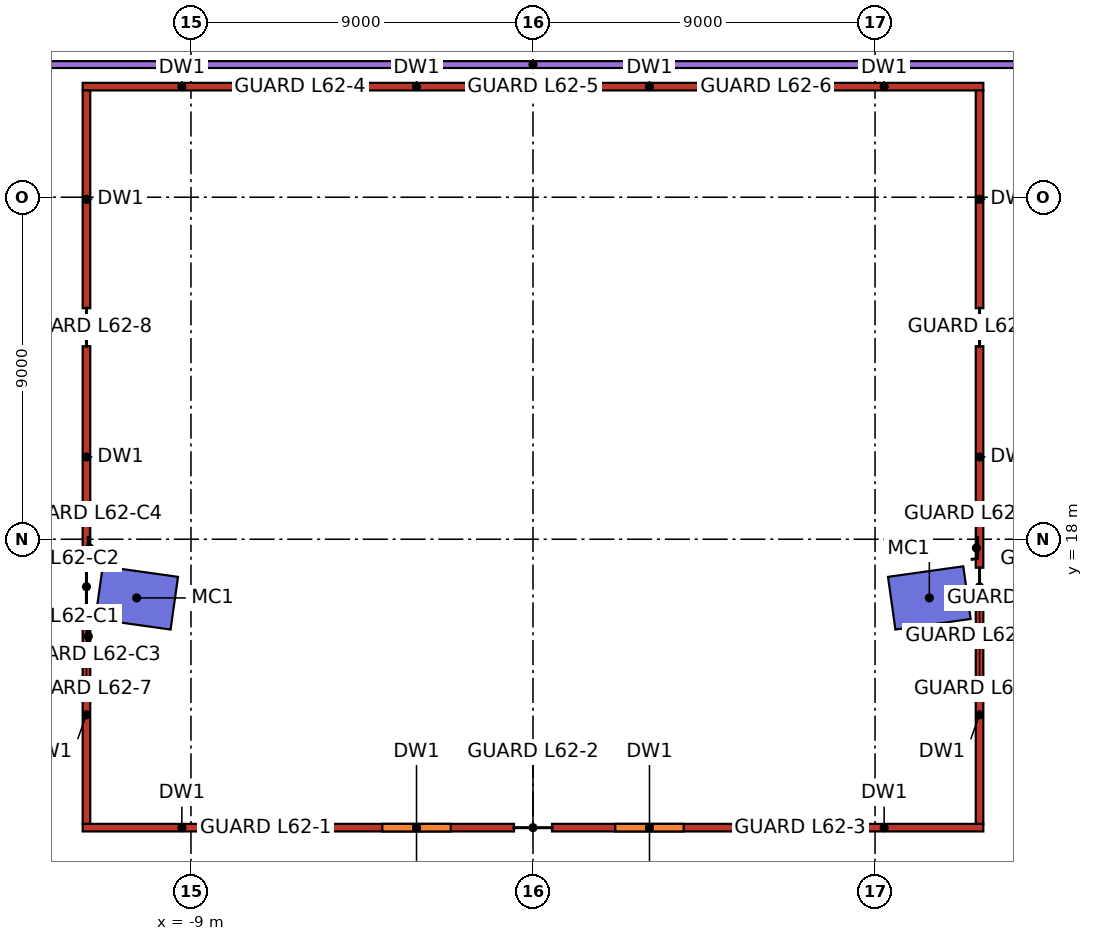
"""IFC4 building model, lengths in metres.
Left out: names, types, materials, properties, quantities, classifications, styles, units other than length and angle.
Written with IfcOpenShell. Run it as: python <this file> out.ifc"""

import sys

from ifc_helpers import new_model, si_unit, direction, frame, frame_2d, origin, origin_2d, place, context, subcontext, project, spatial, rectangle, hollow_rectangle, extrude, element, fill, save


model = new_model("IFC4")
c1 = context("Model", 3, precision=1e-05, world=origin(), true_north=direction((0.0, 1.0)))
c2 = subcontext(c1, "Body", "Model", "MODEL_VIEW")
j1 = project(units=[si_unit("LENGTHUNIT", "METRE"), si_unit("PLANEANGLEUNIT", "RADIAN")], contexts=[c1])
p1 = place(None, origin())
s1 = spatial("IfcSite", under=j1, at=p1, CompositionType="ELEMENT")
p2 = place(p1, origin())
s2 = spatial("IfcBuilding", under=s1, at=p2, CompositionType="ELEMENT")
p3 = place(p2, frame((0.0, 0.0, 258.4)))
s3 = spatial("IfcBuildingStorey", under=s2, at=p3, CompositionType="ELEMENT", Elevation=258.4)
for number, where, z_axis, x_axis in (
    (1, (-10.429, 16.456, 0.0), (0.0, 0.0, 1.0), (-0.99, 0.139, 0.0)),
    (2, (10.429, 16.456, 0.0), (0.0, 0.0, 1.0), (0.99, 0.139, 0.0)),
):
    element("IfcColumn", number, at=place(p3, frame(where, z_axis=z_axis, x_axis=x_axis)), inside=s3, PredefinedType="COLUMN", context=c2, shape_type="SweptSolid", body=[
        extrude(hollow_rectangle(XDim=2.0, YDim=1.4, WallThickness=0.06, at=origin_2d()), origin(), (0.0, 0.0, 1.0), 3.8),
    ])
for number, where, z_axis, x_axis in (
    (3, (-11.85, 10.41, 0.0), (0.0, 0.0, 1.0), (1.0, 0.0, 0.0)),
    (4, (-11.85, 29.91, 0.0), (0.0, 0.0, 1.0), (1.0, 0.0, 0.0)),
):
    element("IfcWall", number, at=place(p3, frame(where, z_axis=z_axis, x_axis=x_axis)), inside=s3, PredefinedType="PARTITIONING", context=c2, shape_type="SweptSolid", body=[
        extrude(rectangle(XDim=5.22, YDim=0.2, at=frame_2d((2.61, 0.0))), origin(), (0.0, 0.0, 1.0), 3.3),
    ])
p4 = place(p3, frame((-5.63, 10.41, 0.0), z_axis=(0.0, 0.0, 1.0), x_axis=(1.0, 0.0, 0.0)))
e5 = element("IfcWall", 5, at=p4, inside=s3, PredefinedType="PARTITIONING", context=c2, shape_type="SweptSolid", body=[
    extrude(rectangle(XDim=5.13, YDim=0.2, at=frame_2d((2.565, 0.0))), origin(), (0.0, 0.0, 1.0), 3.3),
])
p5 = place(p4, frame((1.665, 0.0, 0.0)))
e6 = element("IfcOpeningElement", 6, at=p5, cuts=e5, PredefinedType="OPENING", context=c2, shape_type="SweptSolid", body=[
    extrude(rectangle(XDim=1.8, YDim=2.1, at=frame_2d((0.9, 1.05))), frame((0.0, 0.1, 0.0), z_axis=(0.0, -1.0, 0.0), x_axis=(1.0, 0.0, 0.0)), (0.0, 0.0, 1.0), 0.2),
])
p6 = place(p3, frame((-5.63, 29.91, 0.0), z_axis=(0.0, 0.0, 1.0), x_axis=(1.0, 0.0, 0.0)))
e7 = element("IfcWall", 7, at=p6, inside=s3, PredefinedType="PARTITIONING", context=c2, shape_type="SweptSolid", body=[
    extrude(rectangle(XDim=5.13, YDim=0.2, at=frame_2d((2.565, 0.0))), origin(), (0.0, 0.0, 1.0), 3.3),
])
p7 = place(p3, frame((0.5, 10.41, 0.0), z_axis=(0.0, 0.0, 1.0), x_axis=(1.0, 0.0, 0.0)))
e8 = element("IfcWall", 8, at=p7, inside=s3, PredefinedType="PARTITIONING", context=c2, shape_type="SweptSolid", body=[
    extrude(rectangle(XDim=5.13, YDim=0.2, at=frame_2d((2.565, 0.0))), origin(), (0.0, 0.0, 1.0), 3.3),
])
p8 = place(p7, frame((1.665, 0.0, 0.0)))
e9 = element("IfcOpeningElement", 9, at=p8, cuts=e8, PredefinedType="OPENING", context=c2, shape_type="SweptSolid", body=[
    extrude(rectangle(XDim=1.8, YDim=2.1, at=frame_2d((0.9, 1.05))), frame((0.0, 0.1, 0.0), z_axis=(0.0, -1.0, 0.0), x_axis=(1.0, 0.0, 0.0)), (0.0, 0.0, 1.0), 0.2),
])
p9 = place(p3, frame((0.5, 29.91, 0.0), z_axis=(0.0, 0.0, 1.0), x_axis=(1.0, 0.0, 0.0)))
e10 = element("IfcWall", 10, at=p9, inside=s3, PredefinedType="PARTITIONING", context=c2, shape_type="SweptSolid", body=[
    extrude(rectangle(XDim=5.13, YDim=0.2, at=frame_2d((2.565, 0.0))), origin(), (0.0, 0.0, 1.0), 3.3),
])
for number, where, z_axis, x_axis in (
    (11, (6.63, 10.41, 0.0), (0.0, 0.0, 1.0), (1.0, 0.0, 0.0)),
    (12, (6.63, 29.91, 0.0), (0.0, 0.0, 1.0), (1.0, 0.0, 0.0)),
):
    element("IfcWall", number, at=place(p3, frame(where, z_axis=z_axis, x_axis=x_axis)), inside=s3, PredefinedType="PARTITIONING", context=c2, shape_type="SweptSolid", body=[
        extrude(rectangle(XDim=5.22, YDim=0.2, at=frame_2d((2.61, 0.0))), origin(), (0.0, 0.0, 1.0), 3.3),
    ])
for number, where, z_axis, x_axis in (
    (13, (-11.75, 10.51, 0.0), (0.0, 0.0, 1.0), (0.0, 1.0, 0.0)),
    (14, (11.75, 10.51, 0.0), (0.0, 0.0, 1.0), (0.0, 1.0, 0.0)),
):
    element("IfcWall", number, at=place(p3, frame(where, z_axis=z_axis, x_axis=x_axis)), inside=s3, PredefinedType="PARTITIONING", context=c2, shape_type="SweptSolid", body=[
        extrude(rectangle(XDim=5.74, YDim=0.2, at=frame_2d((2.87, 0.0))), origin(), (0.0, 0.0, 1.0), 3.3),
    ])
for number, where, z_axis, x_axis in (
    (15, (-11.75, 17.25, 0.0), (0.0, 0.0, 1.0), (0.0, 1.0, 0.0)),
    (16, (11.75, 17.25, 0.0), (0.0, 0.0, 1.0), (0.0, 1.0, 0.0)),
):
    element("IfcWall", number, at=place(p3, frame(where, z_axis=z_axis, x_axis=x_axis)), inside=s3, PredefinedType="PARTITIONING", context=c2, shape_type="SweptSolid", body=[
        extrude(rectangle(XDim=5.83, YDim=0.2, at=frame_2d((2.915, 0.0))), origin(), (0.0, 0.0, 1.0), 3.3),
    ])
for number, where, z_axis, x_axis in (
    (17, (-11.75, 24.08, 0.0), (0.0, 0.0, 1.0), (0.0, 1.0, 0.0)),
    (18, (11.75, 24.08, 0.0), (0.0, 0.0, 1.0), (0.0, 1.0, 0.0)),
):
    element("IfcWall", number, at=place(p3, frame(where, z_axis=z_axis, x_axis=x_axis)), inside=s3, PredefinedType="PARTITIONING", context=c2, shape_type="SweptSolid", body=[
        extrude(rectangle(XDim=5.73, YDim=0.2, at=frame_2d((2.865, 0.0))), origin(), (0.0, 0.0, 1.0), 3.3),
    ])
p10 = place(p5, frame((1.8, 0.0, 0.0), z_axis=(0.0, 0.0, 1.0), x_axis=(-1.0, 0.0, 0.0)))
e19 = element("IfcDoor", 19, at=p10, inside=s3, OperationType="DOUBLE_DOOR_SINGLE_SWING", PredefinedType="DOOR", context=c2, shape_type="SweptSolid", body=[
    extrude(rectangle(XDim=0.895, YDim=2.1, at=frame_2d((0.448, 1.05))), frame((0.0, 0.025, 0.0), z_axis=(0.0, -1.0, 0.0), x_axis=(1.0, 0.0, 0.0)), (0.0, 0.0, 1.0), 0.05),
    extrude(rectangle(XDim=0.895, YDim=2.1, at=frame_2d((1.353, 1.05))), frame((0.0, 0.025, 0.0), z_axis=(0.0, -1.0, 0.0), x_axis=(1.0, 0.0, 0.0)), (0.0, 0.0, 1.0), 0.05),
])
fill(e6, e19)
p11 = place(p8, frame((1.8, 0.0, 0.0), z_axis=(0.0, 0.0, 1.0), x_axis=(-1.0, 0.0, 0.0)))
e20 = element("IfcDoor", 20, at=p11, inside=s3, OperationType="DOUBLE_DOOR_SINGLE_SWING", PredefinedType="DOOR", context=c2, shape_type="SweptSolid", body=[
    extrude(rectangle(XDim=0.895, YDim=2.1, at=frame_2d((0.448, 1.05))), frame((0.0, 0.025, 0.0), z_axis=(0.0, -1.0, 0.0), x_axis=(1.0, 0.0, 0.0)), (0.0, 0.0, 1.0), 0.05),
    extrude(rectangle(XDim=0.895, YDim=2.1, at=frame_2d((1.353, 1.05))), frame((0.0, 0.025, 0.0), z_axis=(0.0, -1.0, 0.0), x_axis=(1.0, 0.0, 0.0)), (0.0, 0.0, 1.0), 0.05),
])
fill(e9, e20)
save(model, sys.argv[1])
